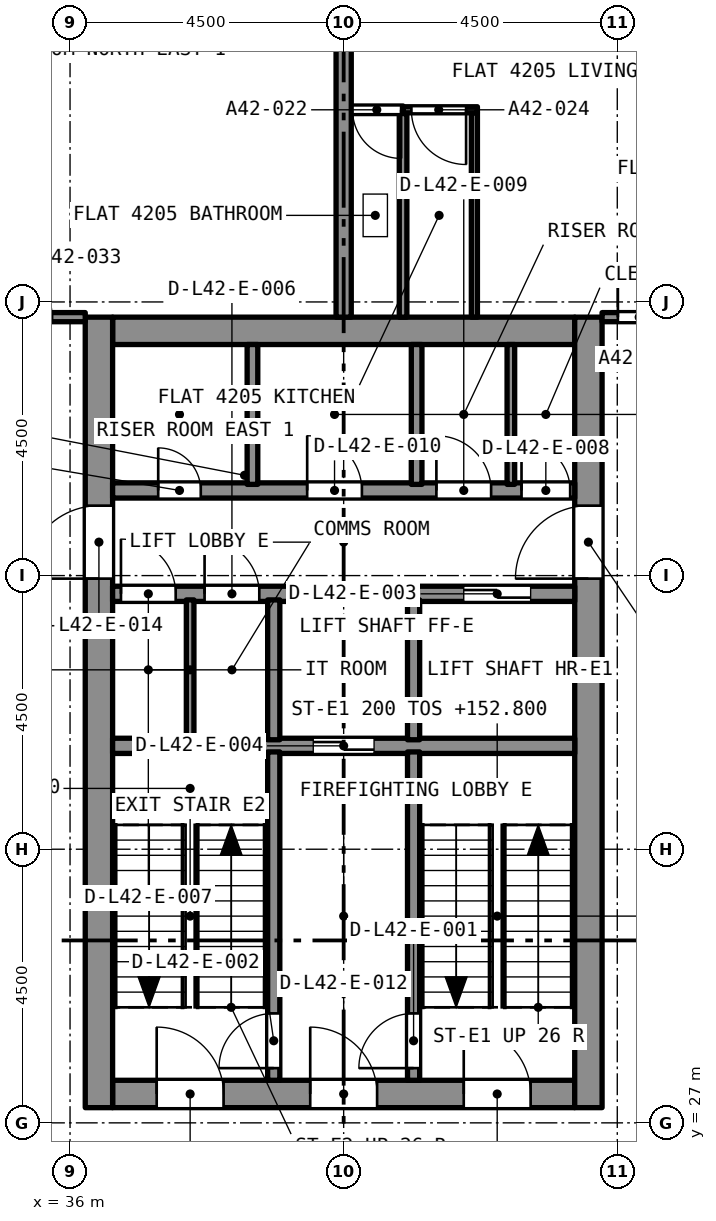
"""IFC4 building model, lengths in metres.
Left out: names, types, materials, properties, quantities, classifications, styles, units other than length and angle.
Written with IfcOpenShell. Run it as: python <this file> out.ifc"""

import sys

from ifc_helpers import new_model, si_unit, direction, frame, frame_2d, origin, place, context, subcontext, project, spatial, rectangle, extrude, element, fill, save


model = new_model("IFC4")
c1 = context("Model", 3, precision=1e-05, world=origin(), true_north=direction((0.0, 1.0)))
c2 = subcontext(c1, "Body", "Model", "MODEL_VIEW")
j1 = project(units=[si_unit("LENGTHUNIT", "METRE"), si_unit("PLANEANGLEUNIT", "RADIAN")], contexts=[c1])
p1 = place(None, origin())
s1 = spatial("IfcSite", under=j1, at=p1, CompositionType="ELEMENT")
p2 = place(p1, origin())
s2 = spatial("IfcBuilding", under=s1, at=p2, CompositionType="ELEMENT")
p3 = place(p2, frame((0.0, 0.0, 150.6)))
s3 = spatial("IfcBuildingStorey", under=s2, at=p3, CompositionType="ELEMENT", Elevation=150.6)
p4 = place(p3, frame((36.7, 27.475, 0.0), z_axis=(0.0, 0.0, 1.0), x_axis=(1.0, 0.0, 0.0)))
e1 = element("IfcWall", 1, at=p4, inside=s3, PredefinedType="SOLIDWALL", context=c2, shape_type="SweptSolid", body=[
    extrude(rectangle(XDim=7.6, YDim=0.45, at=frame_2d((3.8, 0.0))), origin(), (0.0, 0.0, 1.0), 4.4),
])
p5 = place(p4, frame((5.775, 0.0, 0.0)))
e2 = element("IfcOpeningElement", 2, at=p5, cuts=e1, PredefinedType="OPENING", context=c2, shape_type="SweptSolid", body=[
    extrude(rectangle(XDim=1.1, YDim=2.1, at=frame_2d((0.55, 1.05))), frame((0.0, 0.235, 0.0), z_axis=(0.0, -1.0, 0.0), x_axis=(1.0, 0.0, 0.0)), (0.0, 0.0, 1.0), 0.47),
])
p6 = place(p4, frame((3.25, 0.0, 0.0)))
e3 = element("IfcOpeningElement", 3, at=p6, cuts=e1, PredefinedType="OPENING", context=c2, shape_type="SweptSolid", body=[
    extrude(rectangle(XDim=1.1, YDim=2.1, at=frame_2d((0.55, 1.05))), frame((0.0, 0.235, 0.0), z_axis=(0.0, -1.0, 0.0), x_axis=(1.0, 0.0, 0.0)), (0.0, 0.0, 1.0), 0.47),
])
p7 = place(p4, frame((0.725, 0.0, 0.0)))
e4 = element("IfcOpeningElement", 4, at=p7, cuts=e1, PredefinedType="OPENING", context=c2, shape_type="SweptSolid", body=[
    extrude(rectangle(XDim=1.1, YDim=2.1, at=frame_2d((0.55, 1.05))), frame((0.0, 0.235, 0.0), z_axis=(0.0, -1.0, 0.0), x_axis=(1.0, 0.0, 0.0)), (0.0, 0.0, 1.0), 0.47),
])
p8 = place(p3, frame((36.7, 40.025, 0.0), z_axis=(0.0, 0.0, 1.0), x_axis=(1.0, 0.0, 0.0)))
e5 = element("IfcWall", 5, at=p8, inside=s3, PredefinedType="SOLIDWALL", context=c2, shape_type="SweptSolid", body=[
    extrude(rectangle(XDim=7.6, YDim=0.45, at=frame_2d((3.8, 0.0))), origin(), (0.0, 0.0, 1.0), 4.4),
])
p9 = place(p3, frame((36.475, 27.25, 0.0), z_axis=(0.0, 0.0, 1.0), x_axis=(0.0, 1.0, 0.0)))
e6 = element("IfcWall", 6, at=p9, inside=s3, PredefinedType="SOLIDWALL", context=c2, shape_type="SweptSolid", body=[
    extrude(rectangle(XDim=13.0, YDim=0.45, at=frame_2d((6.5, 0.0))), origin(), (0.0, 0.0, 1.0), 4.4),
])
p10 = place(p9, frame((8.7, 0.0, 0.0)))
e7 = element("IfcOpeningElement", 7, at=p10, cuts=e6, PredefinedType="OPENING", context=c2, shape_type="SweptSolid", body=[
    extrude(rectangle(XDim=1.2, YDim=2.1, at=frame_2d((0.6, 1.05))), frame((0.0, 0.235, 0.0), z_axis=(0.0, -1.0, 0.0), x_axis=(1.0, 0.0, 0.0)), (0.0, 0.0, 1.0), 0.47),
])
p11 = place(p3, frame((44.525, 27.25, 0.0), z_axis=(0.0, 0.0, 1.0), x_axis=(0.0, 1.0, 0.0)))
e8 = element("IfcWall", 8, at=p11, inside=s3, PredefinedType="SOLIDWALL", context=c2, shape_type="SweptSolid", body=[
    extrude(rectangle(XDim=13.0, YDim=0.45, at=frame_2d((6.5, 0.0))), origin(), (0.0, 0.0, 1.0), 4.4),
])
p12 = place(p11, frame((8.7, 0.0, 0.0)))
e9 = element("IfcOpeningElement", 9, at=p12, cuts=e8, PredefinedType="OPENING", context=c2, shape_type="SweptSolid", body=[
    extrude(rectangle(XDim=1.2, YDim=2.1, at=frame_2d((0.6, 1.05))), frame((0.0, 0.235, 0.0), z_axis=(0.0, -1.0, 0.0), x_axis=(1.0, 0.0, 0.0)), (0.0, 0.0, 1.0), 0.47),
])
p13 = place(p3, frame((41.477, 43.66, 0.0), z_axis=(0.0, 0.0, 1.0), x_axis=(-1.0, 0.0, 0.0)))
e10 = element("IfcWall", 10, at=p13, inside=s3, PredefinedType="PARTITIONING", context=c2, shape_type="SweptSolid", body=[
    extrude(rectangle(XDim=0.852, YDim=0.125, at=frame_2d((0.426, 0.0))), origin(), (0.0, 0.0, 1.0), 4.1),
])
p14 = place(p13, frame((0.032, 0.0, 0.0)))
e11 = element("IfcOpeningElement", 11, at=p14, cuts=e10, PredefinedType="OPENING", context=c2, shape_type="SweptSolid", body=[
    extrude(rectangle(XDim=0.8, YDim=2.1, at=frame_2d((0.4, 1.05))), frame((0.0, 0.073, 0.0), z_axis=(0.0, -1.0, 0.0), x_axis=(1.0, 0.0, 0.0)), (0.0, 0.0, 1.0), 0.145),
])
p15 = place(p3, frame((41.477, 40.25, 0.0), z_axis=(0.0, 0.0, 1.0), x_axis=(0.0, 1.0, 0.0)))
e12 = element("IfcWall", 12, at=p15, inside=s3, PredefinedType="PARTITIONING", context=c2, shape_type="SweptSolid", body=[
    extrude(rectangle(XDim=3.347, YDim=0.125, at=frame_2d((1.674, 0.0))), origin(), (0.0, 0.0, 1.0), 4.1),
])
p16 = place(p3, frame((40.5, 40.25, 0.0), z_axis=(0.0, 0.0, 1.0), x_axis=(0.0, 1.0, 0.0)))
e13 = element("IfcWall", 13, at=p16, inside=s3, PredefinedType="PARTITIONING", context=c2, shape_type="SweptSolid", body=[
    extrude(rectangle(XDim=8.775, YDim=0.25, at=frame_2d((4.387, 0.0))), origin(), (0.0, 0.0, 1.0), 4.1),
])
p17 = place(p3, frame((42.65, 40.25, 0.0), z_axis=(0.0, 0.0, 1.0), x_axis=(0.0, 1.0, 0.0)))
e14 = element("IfcWall", 14, at=p17, inside=s3, PredefinedType="PARTITIONING", context=c2, shape_type="SweptSolid", body=[
    extrude(rectangle(XDim=3.36, YDim=0.1, at=frame_2d((1.68, 0.0))), origin(), (0.0, 0.0, 1.0), 4.1),
])
p18 = place(p3, frame((42.7, 43.66, 0.0), z_axis=(0.0, 0.0, 1.0), x_axis=(-1.0, 0.0, 0.0)))
e15 = element("IfcWall", 15, at=p18, inside=s3, PredefinedType="PARTITIONING", context=c2, shape_type="SweptSolid", body=[
    extrude(rectangle(XDim=1.223, YDim=0.1, at=frame_2d((0.611, 0.0))), origin(), (0.0, 0.0, 1.0), 4.1),
])
p19 = place(p18, frame((0.186, 0.0, 0.0)))
e16 = element("IfcOpeningElement", 16, at=p19, cuts=e15, PredefinedType="OPENING", context=c2, shape_type="SweptSolid", body=[
    extrude(rectangle(XDim=0.9, YDim=2.1, at=frame_2d((0.45, 1.05))), frame((0.0, 0.06, 0.0), z_axis=(0.0, -1.0, 0.0), x_axis=(1.0, 0.0, 0.0)), (0.0, 0.0, 1.0), 0.12),
])
p20 = place(p3, frame((44.75, 40.25, 0.0), z_axis=(0.0, 0.0, 1.0), x_axis=(1.0, 0.0, 0.0)))
e17 = element("IfcWall", 17, at=p20, inside=s3, PredefinedType="PARTITIONING", context=c2, shape_type="SweptSolid", body=[
    extrude(rectangle(XDim=1.2, YDim=0.15, at=frame_2d((0.6, 0.0))), origin(), (0.0, 0.0, 1.0), 4.1),
])
p21 = place(p20, frame((0.26, 0.0, 0.0)))
e18 = element("IfcOpeningElement", 18, at=p21, cuts=e17, PredefinedType="OPENING", context=c2, shape_type="SweptSolid", body=[
    extrude(rectangle(XDim=0.7, YDim=2.1, at=frame_2d((0.35, 1.05))), frame((0.0, 0.085, 0.0), z_axis=(0.0, -1.0, 0.0), x_axis=(1.0, 0.0, 0.0)), (0.0, 0.0, 1.0), 0.17),
])
p22 = place(p3, frame((34.575, 40.25, 0.0), z_axis=(0.0, 0.0, 1.0), x_axis=(1.0, 0.0, 0.0)))
e19 = element("IfcWall", 19, at=p22, inside=s3, PredefinedType="PARTITIONING", context=c2, shape_type="SweptSolid", body=[
    extrude(rectangle(XDim=1.675, YDim=0.15, at=frame_2d((0.837, 0.0))), origin(), (0.0, 0.0, 1.0), 4.1),
])
p23 = place(p22, frame((0.13, 0.0, 0.0)))
e20 = element("IfcOpeningElement", 20, at=p23, cuts=e19, PredefinedType="OPENING", context=c2, shape_type="SweptSolid", body=[
    extrude(rectangle(XDim=1.0, YDim=2.1, at=frame_2d((0.5, 1.05))), frame((0.0, 0.085, 0.0), z_axis=(0.0, -1.0, 0.0), x_axis=(1.0, 0.0, 0.0)), (0.0, 0.0, 1.0), 0.17),
])
p24 = place(p3, frame((36.7, 33.2, 0.0), z_axis=(0.0, 0.0, 1.0), x_axis=(1.0, 0.0, 0.0)))
e21 = element("IfcWall", 21, at=p24, inside=s3, PredefinedType="SOLIDWALL", context=c2, shape_type="SweptSolid", body=[
    extrude(rectangle(XDim=7.6, YDim=0.25, at=frame_2d((3.8, 0.0))), origin(), (0.0, 0.0, 1.0), 4.1),
])
p25 = place(p24, frame((3.3, 0.0, 0.0)))
e22 = element("IfcOpeningElement", 22, at=p25, cuts=e21, PredefinedType="OPENING", context=c2, shape_type="SweptSolid", body=[
    extrude(rectangle(XDim=1.0, YDim=2.1, at=frame_2d((0.5, 1.05))), frame((0.0, 0.135, 0.0), z_axis=(0.0, -1.0, 0.0), x_axis=(1.0, 0.0, 0.0)), (0.0, 0.0, 1.0), 0.27),
])
p26 = place(p3, frame((36.7, 35.7, 0.0), z_axis=(0.0, 0.0, 1.0), x_axis=(1.0, 0.0, 0.0)))
e23 = element("IfcWall", 23, at=p26, inside=s3, PredefinedType="SOLIDWALL", context=c2, shape_type="SweptSolid", body=[
    extrude(rectangle(XDim=7.6, YDim=0.25, at=frame_2d((3.8, 0.0))), origin(), (0.0, 0.0, 1.0), 4.1),
])
p27 = place(p26, frame((5.775, 0.0, 0.0)))
e24 = element("IfcOpeningElement", 24, at=p27, cuts=e23, PredefinedType="OPENING", context=c2, shape_type="SweptSolid", body=[
    extrude(rectangle(XDim=1.1, YDim=2.4, at=frame_2d((0.55, 1.2))), frame((0.0, 0.135, 0.0), z_axis=(0.0, -1.0, 0.0), x_axis=(1.0, 0.0, 0.0)), (0.0, 0.0, 1.0), 0.27),
])
p28 = place(p26, frame((1.512, 0.0, 0.0)))
e25 = element("IfcOpeningElement", 25, at=p28, cuts=e23, PredefinedType="OPENING", context=c2, shape_type="SweptSolid", body=[
    extrude(rectangle(XDim=0.9, YDim=2.1, at=frame_2d((0.45, 1.05))), frame((0.0, 0.135, 0.0), z_axis=(0.0, -1.0, 0.0), x_axis=(1.0, 0.0, 0.0)), (0.0, 0.0, 1.0), 0.27),
])
p29 = place(p26, frame((0.137, 0.0, 0.0)))
e26 = element("IfcOpeningElement", 26, at=p29, cuts=e23, PredefinedType="OPENING", context=c2, shape_type="SweptSolid", body=[
    extrude(rectangle(XDim=0.9, YDim=2.1, at=frame_2d((0.45, 1.05))), frame((0.0, 0.135, 0.0), z_axis=(0.0, -1.0, 0.0), x_axis=(1.0, 0.0, 0.0)), (0.0, 0.0, 1.0), 0.27),
])
p30 = place(p3, frame((36.7, 37.4, 0.0), z_axis=(0.0, 0.0, 1.0), x_axis=(1.0, 0.0, 0.0)))
e27 = element("IfcWall", 27, at=p30, inside=s3, PredefinedType="SOLIDWALL", context=c2, shape_type="SweptSolid", body=[
    extrude(rectangle(XDim=7.6, YDim=0.25, at=frame_2d((3.8, 0.0))), origin(), (0.0, 0.0, 1.0), 4.1),
])
p31 = place(p30, frame((0.75, 0.0, 0.0)))
e28 = element("IfcOpeningElement", 28, at=p31, cuts=e27, PredefinedType="OPENING", context=c2, shape_type="SweptSolid", body=[
    extrude(rectangle(XDim=0.7, YDim=2.1, at=frame_2d((0.35, 1.05))), frame((0.0, 0.135, 0.0), z_axis=(0.0, -1.0, 0.0), x_axis=(1.0, 0.0, 0.0)), (0.0, 0.0, 1.0), 0.27),
])
p32 = place(p30, frame((6.725, 0.0, 0.0)))
e29 = element("IfcOpeningElement", 29, at=p32, cuts=e27, PredefinedType="OPENING", context=c2, shape_type="SweptSolid", body=[
    extrude(rectangle(XDim=0.8, YDim=2.1, at=frame_2d((0.4, 1.05))), frame((0.0, 0.135, 0.0), z_axis=(0.0, -1.0, 0.0), x_axis=(1.0, 0.0, 0.0)), (0.0, 0.0, 1.0), 0.27),
])
p33 = place(p30, frame((5.325, 0.0, 0.0)))
e30 = element("IfcOpeningElement", 30, at=p33, cuts=e27, PredefinedType="OPENING", context=c2, shape_type="SweptSolid", body=[
    extrude(rectangle(XDim=0.9, YDim=2.1, at=frame_2d((0.45, 1.05))), frame((0.0, 0.135, 0.0), z_axis=(0.0, -1.0, 0.0), x_axis=(1.0, 0.0, 0.0)), (0.0, 0.0, 1.0), 0.27),
])
p34 = place(p30, frame((3.2, 0.0, 0.0)))
e31 = element("IfcOpeningElement", 31, at=p34, cuts=e27, PredefinedType="OPENING", context=c2, shape_type="SweptSolid", body=[
    extrude(rectangle(XDim=0.9, YDim=2.1, at=frame_2d((0.45, 1.05))), frame((0.0, 0.135, 0.0), z_axis=(0.0, -1.0, 0.0), x_axis=(1.0, 0.0, 0.0)), (0.0, 0.0, 1.0), 0.27),
])
p35 = place(p3, frame((41.65, 27.7, 0.0), z_axis=(0.0, 0.0, 1.0), x_axis=(0.0, 1.0, 0.0)))
e32 = element("IfcWall", 32, at=p35, inside=s3, PredefinedType="SOLIDWALL", context=c2, shape_type="SweptSolid", body=[
    extrude(rectangle(XDim=5.4, YDim=0.2, at=frame_2d((2.7, 0.0))), origin(), (0.0, 0.0, 1.0), 4.1),
])
p36 = place(p35, frame((0.2, 0.0, 0.0)))
e33 = element("IfcOpeningElement", 33, at=p36, cuts=e32, PredefinedType="OPENING", context=c2, shape_type="SweptSolid", body=[
    extrude(rectangle(XDim=0.9, YDim=2.1, at=frame_2d((0.45, 1.05))), frame((0.0, 0.11, 0.0), z_axis=(0.0, -1.0, 0.0), x_axis=(1.0, 0.0, 0.0)), (0.0, 0.0, 1.0), 0.22),
])
p37 = place(p3, frame((39.35, 27.7, 0.0), z_axis=(0.0, 0.0, 1.0), x_axis=(0.0, 1.0, 0.0)))
e34 = element("IfcWall", 34, at=p37, inside=s3, PredefinedType="SOLIDWALL", context=c2, shape_type="SweptSolid", body=[
    extrude(rectangle(XDim=5.4, YDim=0.2, at=frame_2d((2.7, 0.0))), origin(), (0.0, 0.0, 1.0), 4.1),
])
p38 = place(p37, frame((0.2, 0.0, 0.0)))
e35 = element("IfcOpeningElement", 35, at=p38, cuts=e34, PredefinedType="OPENING", context=c2, shape_type="SweptSolid", body=[
    extrude(rectangle(XDim=0.9, YDim=2.1, at=frame_2d((0.45, 1.05))), frame((0.0, 0.11, 0.0), z_axis=(0.0, -1.0, 0.0), x_axis=(1.0, 0.0, 0.0)), (0.0, 0.0, 1.0), 0.22),
])
for number, where, z_axis, x_axis in (
    (36, (41.65, 33.3, 0.0), (0.0, 0.0, 1.0), (0.0, 1.0, 0.0)),
    (37, (39.35, 33.3, 0.0), (0.0, 0.0, 1.0), (0.0, 1.0, 0.0)),
):
    element("IfcWall", number, at=place(p3, frame(where, z_axis=z_axis, x_axis=x_axis)), inside=s3, PredefinedType="SOLIDWALL", context=c2, shape_type="SweptSolid", body=[
        extrude(rectangle(XDim=2.3, YDim=0.2, at=frame_2d((1.15, 0.0))), origin(), (0.0, 0.0, 1.0), 4.1),
    ])
for number, where, z_axis, x_axis in (
    (38, (41.7, 37.5, 0.0), (0.0, 0.0, 1.0), (0.0, 1.0, 0.0)),
    (39, (39.0, 37.5, 0.0), (0.0, 0.0, 1.0), (0.0, 1.0, 0.0)),
):
    element("IfcWall", number, at=place(p3, frame(where, z_axis=z_axis, x_axis=x_axis)), inside=s3, PredefinedType="SOLIDWALL", context=c2, shape_type="SweptSolid", body=[
        extrude(rectangle(XDim=2.3, YDim=0.175, at=frame_2d((1.15, 0.0))), origin(), (0.0, 0.0, 1.0), 4.1),
    ])
for number, where, z_axis, x_axis in (
    (40, (37.975, 33.3, 0.0), (0.0, 0.0, 1.0), (0.0, 1.0, 0.0)),
    (41, (43.25, 37.5, 0.0), (0.0, 0.0, 1.0), (0.0, 1.0, 0.0)),
):
    element("IfcWall", number, at=place(p3, frame(where, z_axis=z_axis, x_axis=x_axis)), inside=s3, PredefinedType="PARTITIONING", context=c2, shape_type="SweptSolid", body=[
        extrude(rectangle(XDim=2.3, YDim=0.125, at=frame_2d((1.15, 0.0))), origin(), (0.0, 0.0, 1.0), 4.1),
    ])
p39 = place(p14, origin())
e42 = element("IfcDoor", 42, at=p39, inside=s3, OperationType="SINGLE_SWING_RIGHT", PredefinedType="DOOR", context=c2, shape_type="SweptSolid", body=[
    extrude(rectangle(XDim=0.8, YDim=2.1, at=frame_2d((0.4, 1.05))), frame((0.0, 0.025, 0.0), z_axis=(0.0, -1.0, 0.0), x_axis=(1.0, 0.0, 0.0)), (0.0, 0.0, 1.0), 0.05),
])
fill(e11, e42)
p40 = place(p19, origin())
e43 = element("IfcDoor", 43, at=p40, inside=s3, OperationType="SINGLE_SWING_RIGHT", PredefinedType="DOOR", context=c2, shape_type="SweptSolid", body=[
    extrude(rectangle(XDim=0.9, YDim=2.1, at=frame_2d((0.45, 1.05))), frame((0.0, 0.025, 0.0), z_axis=(0.0, -1.0, 0.0), x_axis=(1.0, 0.0, 0.0)), (0.0, 0.0, 1.0), 0.05),
])
fill(e16, e43)
p41 = place(p21, origin())
e44 = element("IfcDoor", 44, at=p41, inside=s3, OperationType="SINGLE_SWING_RIGHT", PredefinedType="DOOR", context=c2, shape_type="SweptSolid", body=[
    extrude(rectangle(XDim=0.7, YDim=2.1, at=frame_2d((0.35, 1.05))), frame((0.0, 0.025, 0.0), z_axis=(0.0, -1.0, 0.0), x_axis=(1.0, 0.0, 0.0)), (0.0, 0.0, 1.0), 0.05),
])
fill(e18, e44)
p42 = place(p23, origin())
e45 = element("IfcDoor", 45, at=p42, inside=s3, OperationType="SINGLE_SWING_LEFT", PredefinedType="DOOR", context=c2, shape_type="SweptSolid", body=[
    extrude(rectangle(XDim=1.0, YDim=2.1, at=frame_2d((0.5, 1.05))), frame((0.0, 0.025, 0.0), z_axis=(0.0, -1.0, 0.0), x_axis=(1.0, 0.0, 0.0)), (0.0, 0.0, 1.0), 0.05),
])
fill(e20, e45)
p43 = place(p36, origin())
e46 = element("IfcDoor", 46, at=p43, inside=s3, OperationType="SINGLE_SWING_LEFT", PredefinedType="DOOR", context=c2, shape_type="SweptSolid", body=[
    extrude(rectangle(XDim=0.9, YDim=2.1, at=frame_2d((0.45, 1.05))), frame((0.0, 0.025, 0.0), z_axis=(0.0, -1.0, 0.0), x_axis=(1.0, 0.0, 0.0)), (0.0, 0.0, 1.0), 0.05),
])
fill(e33, e46)
p44 = place(p38, origin())
e47 = element("IfcDoor", 47, at=p44, inside=s3, OperationType="SINGLE_SWING_LEFT", PredefinedType="DOOR", context=c2, shape_type="SweptSolid", body=[
    extrude(rectangle(XDim=0.9, YDim=2.1, at=frame_2d((0.45, 1.05))), frame((0.0, 0.025, 0.0), z_axis=(0.0, -1.0, 0.0), x_axis=(1.0, 0.0, 0.0)), (0.0, 0.0, 1.0), 0.05),
])
fill(e35, e47)
p45 = place(p27, origin())
e48 = element("IfcDoor", 48, at=p45, inside=s3, OperationType="SLIDING_TO_LEFT", PredefinedType="DOOR", context=c2, shape_type="SweptSolid", body=[
    extrude(rectangle(XDim=1.1, YDim=2.4, at=frame_2d((0.55, 1.2))), frame((0.0, 0.025, 0.0), z_axis=(0.0, -1.0, 0.0), x_axis=(1.0, 0.0, 0.0)), (0.0, 0.0, 1.0), 0.05),
])
fill(e24, e48)
p46 = place(p25, origin())
e49 = element("IfcDoor", 49, at=p46, inside=s3, OperationType="SLIDING_TO_LEFT", PredefinedType="DOOR", context=c2, shape_type="SweptSolid", body=[
    extrude(rectangle(XDim=1.0, YDim=2.1, at=frame_2d((0.5, 1.05))), frame((0.0, 0.025, 0.0), z_axis=(0.0, -1.0, 0.0), x_axis=(1.0, 0.0, 0.0)), (0.0, 0.0, 1.0), 0.05),
])
fill(e22, e49)
p47 = place(p31, origin())
e50 = element("IfcDoor", 50, at=p47, inside=s3, OperationType="SINGLE_SWING_LEFT", PredefinedType="DOOR", context=c2, shape_type="SweptSolid", body=[
    extrude(rectangle(XDim=0.7, YDim=2.1, at=frame_2d((0.35, 1.05))), frame((0.0, 0.025, 0.0), z_axis=(0.0, -1.0, 0.0), x_axis=(1.0, 0.0, 0.0)), (0.0, 0.0, 1.0), 0.05),
])
fill(e28, e50)
p48 = place(p28, origin())
e51 = element("IfcDoor", 51, at=p48, inside=s3, OperationType="SINGLE_SWING_LEFT", PredefinedType="DOOR", context=c2, shape_type="SweptSolid", body=[
    extrude(rectangle(XDim=0.9, YDim=2.1, at=frame_2d((0.45, 1.05))), frame((0.0, 0.025, 0.0), z_axis=(0.0, -1.0, 0.0), x_axis=(1.0, 0.0, 0.0)), (0.0, 0.0, 1.0), 0.05),
])
fill(e25, e51)
p49 = place(p29, origin())
e52 = element("IfcDoor", 52, at=p49, inside=s3, OperationType="SINGLE_SWING_LEFT", PredefinedType="DOOR", context=c2, shape_type="SweptSolid", body=[
    extrude(rectangle(XDim=0.9, YDim=2.1, at=frame_2d((0.45, 1.05))), frame((0.0, 0.025, 0.0), z_axis=(0.0, -1.0, 0.0), x_axis=(1.0, 0.0, 0.0)), (0.0, 0.0, 1.0), 0.05),
])
fill(e26, e52)
p50 = place(p32, origin())
e53 = element("IfcDoor", 53, at=p50, inside=s3, OperationType="SINGLE_SWING_LEFT", PredefinedType="DOOR", context=c2, shape_type="SweptSolid", body=[
    extrude(rectangle(XDim=0.8, YDim=2.1, at=frame_2d((0.4, 1.05))), frame((0.0, 0.025, 0.0), z_axis=(0.0, -1.0, 0.0), x_axis=(1.0, 0.0, 0.0)), (0.0, 0.0, 1.0), 0.05),
])
fill(e29, e53)
p51 = place(p33, origin())
e54 = element("IfcDoor", 54, at=p51, inside=s3, OperationType="SINGLE_SWING_LEFT", PredefinedType="DOOR", context=c2, shape_type="SweptSolid", body=[
    extrude(rectangle(XDim=0.9, YDim=2.1, at=frame_2d((0.45, 1.05))), frame((0.0, 0.025, 0.0), z_axis=(0.0, -1.0, 0.0), x_axis=(1.0, 0.0, 0.0)), (0.0, 0.0, 1.0), 0.05),
])
fill(e30, e54)
p52 = place(p34, origin())
e55 = element("IfcDoor", 55, at=p52, inside=s3, OperationType="SINGLE_SWING_LEFT", PredefinedType="DOOR", context=c2, shape_type="SweptSolid", body=[
    extrude(rectangle(XDim=0.9, YDim=2.1, at=frame_2d((0.45, 1.05))), frame((0.0, 0.025, 0.0), z_axis=(0.0, -1.0, 0.0), x_axis=(1.0, 0.0, 0.0)), (0.0, 0.0, 1.0), 0.05),
])
fill(e31, e55)
p53 = place(p5, origin())
e56 = element("IfcDoor", 56, at=p53, inside=s3, OperationType="SINGLE_SWING_LEFT", PredefinedType="DOOR", context=c2, shape_type="SweptSolid", body=[
    extrude(rectangle(XDim=1.1, YDim=2.1, at=frame_2d((0.55, 1.05))), frame((0.0, 0.025, 0.0), z_axis=(0.0, -1.0, 0.0), x_axis=(1.0, 0.0, 0.0)), (0.0, 0.0, 1.0), 0.05),
])
fill(e2, e56)
p54 = place(p6, origin())
e57 = element("IfcDoor", 57, at=p54, inside=s3, OperationType="SINGLE_SWING_LEFT", PredefinedType="DOOR", context=c2, shape_type="SweptSolid", body=[
    extrude(rectangle(XDim=1.1, YDim=2.1, at=frame_2d((0.55, 1.05))), frame((0.0, 0.025, 0.0), z_axis=(0.0, -1.0, 0.0), x_axis=(1.0, 0.0, 0.0)), (0.0, 0.0, 1.0), 0.05),
])
fill(e3, e57)
p55 = place(p7, origin())
e58 = element("IfcDoor", 58, at=p55, inside=s3, OperationType="SINGLE_SWING_LEFT", PredefinedType="DOOR", context=c2, shape_type="SweptSolid", body=[
    extrude(rectangle(XDim=1.1, YDim=2.1, at=frame_2d((0.55, 1.05))), frame((0.0, 0.025, 0.0), z_axis=(0.0, -1.0, 0.0), x_axis=(1.0, 0.0, 0.0)), (0.0, 0.0, 1.0), 0.05),
])
fill(e4, e58)
p56 = place(p10, origin())
e59 = element("IfcDoor", 59, at=p56, inside=s3, OperationType="SINGLE_SWING_LEFT", PredefinedType="DOOR", context=c2, shape_type="SweptSolid", body=[
    extrude(rectangle(XDim=1.2, YDim=2.1, at=frame_2d((0.6, 1.05))), frame((0.0, 0.025, 0.0), z_axis=(0.0, -1.0, 0.0), x_axis=(1.0, 0.0, 0.0)), (0.0, 0.0, 1.0), 0.05),
])
fill(e7, e59)
p57 = place(p12, origin())
e60 = element("IfcDoor", 60, at=p57, inside=s3, OperationType="SINGLE_SWING_LEFT", PredefinedType="DOOR", context=c2, shape_type="SweptSolid", body=[
    extrude(rectangle(XDim=1.2, YDim=2.1, at=frame_2d((0.6, 1.05))), frame((0.0, 0.025, 0.0), z_axis=(0.0, -1.0, 0.0), x_axis=(1.0, 0.0, 0.0)), (0.0, 0.0, 1.0), 0.05),
])
fill(e9, e60)
save(model, sys.argv[1])
